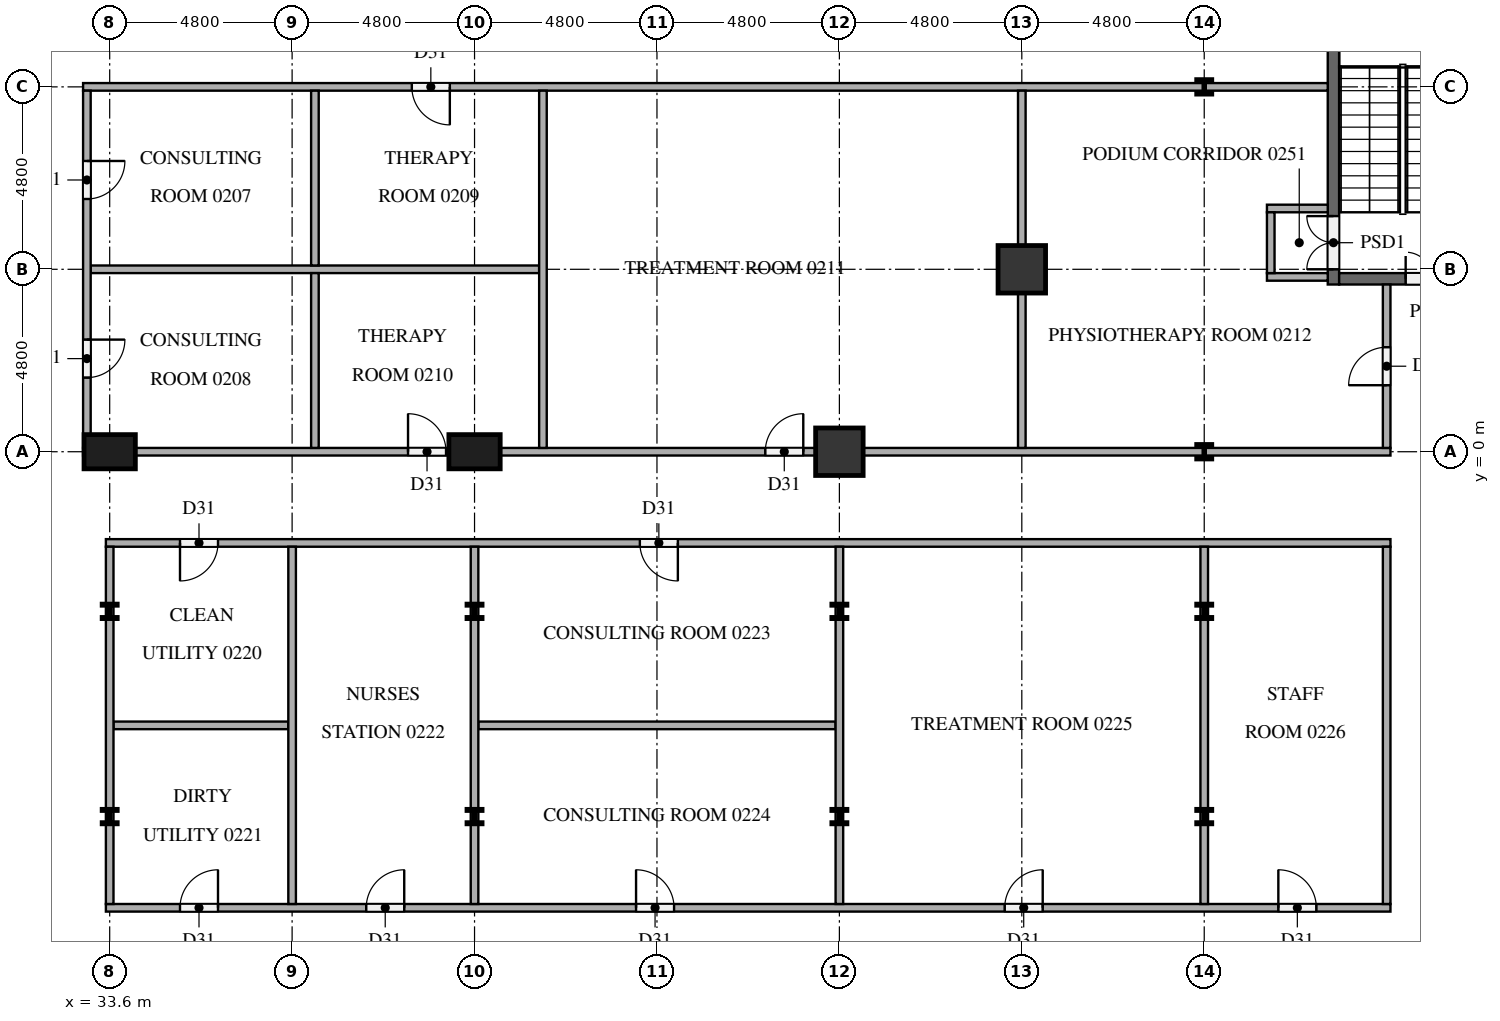
"""IFC4 building model, lengths in metres.
Left out: names, types, materials, properties, quantities, classifications, styles, units other than length and angle.
Written with IfcOpenShell. Run it as: python <this file> out.ifc"""

import sys

from ifc_helpers import new_model, si_unit, direction, frame, frame_2d, origin, origin_2d, place, context, subcontext, project, spatial, rectangle, i_section, extrude, element, fill, save


model = new_model("IFC4")
c1 = context("Model", 3, precision=1e-05, world=origin(), true_north=direction((0.0, 1.0)))
c2 = subcontext(c1, "Body", "Model", "MODEL_VIEW")
j1 = project(units=[si_unit("LENGTHUNIT", "METRE"), si_unit("PLANEANGLEUNIT", "RADIAN")], contexts=[c1])
p1 = place(None, origin())
s1 = spatial("IfcSite", under=j1, at=p1, CompositionType="ELEMENT")
p2 = place(p1, origin())
s2 = spatial("IfcBuilding", under=s1, at=p2, CompositionType="ELEMENT")
p3 = place(p2, frame((0.0, 0.0, 10.5)))
s3 = spatial("IfcBuildingStorey", under=s2, at=p3, CompositionType="ELEMENT", Elevation=10.5)
p4 = place(p3, frame((65.8, 4.4, 0.0), z_axis=(0.0, 0.0, 1.0), x_axis=(0.0, 1.0, 0.0)))
e1 = element("IfcWall", 1, at=p4, inside=s3, PredefinedType="SOLIDWALL", context=c2, shape_type="SweptSolid", body=[
    extrude(rectangle(XDim=8.0, YDim=0.3, at=frame_2d((4.0, 0.0))), origin(), (0.0, 0.0, 1.0), 4.2),
])
p5 = place(p4, frame((0.4, 0.0, 0.0)))
e2 = element("IfcOpeningElement", 2, at=p5, cuts=e1, PredefinedType="OPENING", context=c2, shape_type="SweptSolid", body=[
    extrude(rectangle(XDim=1.4, YDim=2.1, at=frame_2d((0.7, 1.05))), frame((0.0, 0.16, 0.0), z_axis=(0.0, -1.0, 0.0), x_axis=(1.0, 0.0, 0.0)), (0.0, 0.0, 1.0), 0.32),
])
p6 = place(p3, frame((65.95, 4.55, 0.0), z_axis=(0.0, 0.0, 1.0), x_axis=(1.0, 0.0, 0.0)))
e3 = element("IfcWall", 3, at=p6, inside=s3, PredefinedType="SOLIDWALL", context=c2, shape_type="SweptSolid", body=[
    extrude(rectangle(XDim=3.35, YDim=0.3, at=frame_2d((1.675, 0.0))), origin(), (0.0, 0.0, 1.0), 4.2),
])
p7 = place(p6, frame((1.75, 0.0, 0.0)))
e4 = element("IfcOpeningElement", 4, at=p7, cuts=e3, PredefinedType="OPENING", context=c2, shape_type="SweptSolid", body=[
    extrude(rectangle(XDim=1.4, YDim=2.1, at=frame_2d((0.7, 1.05))), frame((0.0, 0.16, 0.0), z_axis=(0.0, -1.0, 0.0), x_axis=(1.0, 0.0, 0.0)), (0.0, 0.0, 1.0), 0.32),
])
for number, where, z_axis, x_axis in (
    (5, (33.6, 0.0, 0.0), (0.0, 0.0, 1.0), (1.0, 0.0, 0.0)),
    (6, (43.2, 0.0, 0.0), (0.0, 0.0, 1.0), (1.0, 0.0, 0.0)),
):
    element("IfcColumn", number, at=place(p3, frame(where, z_axis=z_axis, x_axis=x_axis)), inside=s3, PredefinedType="COLUMN", context=c2, shape_type="SweptSolid", body=[
        extrude(rectangle(XDim=1.35, YDim=0.9, at=origin_2d()), origin(), (0.0, 0.0, 1.0), 4.2),
    ])
for number, where, z_axis, x_axis in (
    (7, (52.8, 0.0, 0.0), (0.0, 0.0, 1.0), (1.0, 0.0, 0.0)),
    (8, (57.6, 4.8, 0.0), (0.0, 0.0, 1.0), (1.0, 0.0, 0.0)),
):
    element("IfcColumn", number, at=place(p3, frame(where, z_axis=z_axis, x_axis=x_axis)), inside=s3, PredefinedType="COLUMN", context=c2, shape_type="SweptSolid", body=[
        extrude(rectangle(XDim=1.25, YDim=1.25, at=origin_2d()), origin(), (0.0, 0.0, 1.0), 4.2),
    ])
for number, where, z_axis, x_axis in (
    (9, (33.6, -9.6, 0.0), (0.0, 0.0, 1.0), (1.0, 0.0, 0.0)),
    (10, (33.6, -4.2, 0.0), (0.0, 0.0, 1.0), (1.0, 0.0, 0.0)),
    (11, (43.2, -9.6, 0.0), (0.0, 0.0, 1.0), (1.0, 0.0, 0.0)),
    (12, (43.2, -4.2, 0.0), (0.0, 0.0, 1.0), (1.0, 0.0, 0.0)),
    (13, (52.8, -9.6, 0.0), (0.0, 0.0, 1.0), (1.0, 0.0, 0.0)),
    (14, (52.8, -4.2, 0.0), (0.0, 0.0, 1.0), (1.0, 0.0, 0.0)),
    (15, (62.4, -9.6, 0.0), (0.0, 0.0, 1.0), (1.0, 0.0, 0.0)),
    (16, (62.4, -4.2, 0.0), (0.0, 0.0, 1.0), (1.0, 0.0, 0.0)),
    (17, (62.4, 0.0, 0.0), (0.0, 0.0, 1.0), (1.0, 0.0, 0.0)),
    (18, (62.4, 9.6, 0.0), (0.0, 0.0, 1.0), (1.0, 0.0, 0.0)),
):
    element("IfcColumn", number, at=place(p3, frame(where, z_axis=z_axis, x_axis=x_axis)), inside=s3, PredefinedType="COLUMN", context=c2, shape_type="SweptSolid", body=[
        extrude(i_section(OverallWidth=0.396, OverallDepth=0.381, WebThickness=0.019, FlangeThickness=0.03, at=origin_2d()), origin(), (0.0, 0.0, 1.0), 4.2),
    ])
p8 = place(p3, frame((33.5, -12.0, 0.0), z_axis=(0.0, 0.0, 1.0), x_axis=(1.0, 0.0, 0.0)))
e19 = element("IfcWall", 19, at=p8, inside=s3, PredefinedType="PARTITIONING", context=c2, shape_type="SweptSolid", body=[
    extrude(rectangle(XDim=33.8, YDim=0.2, at=frame_2d((16.9, 0.0))), origin(), (0.0, 0.0, 1.0), 4.2),
])
p9 = place(p8, frame((1.95, 0.0, 0.0)))
e20 = element("IfcOpeningElement", 20, at=p9, cuts=e19, PredefinedType="OPENING", context=c2, shape_type="SweptSolid", body=[
    extrude(rectangle(XDim=1.0, YDim=2.1, at=frame_2d((0.5, 1.05))), frame((0.0, 0.11, 0.0), z_axis=(0.0, -1.0, 0.0), x_axis=(1.0, 0.0, 0.0)), (0.0, 0.0, 1.0), 0.22),
])
p10 = place(p8, frame((6.85, 0.0, 0.0)))
e21 = element("IfcOpeningElement", 21, at=p10, cuts=e19, PredefinedType="OPENING", context=c2, shape_type="SweptSolid", body=[
    extrude(rectangle(XDim=1.0, YDim=2.1, at=frame_2d((0.5, 1.05))), frame((0.0, 0.11, 0.0), z_axis=(0.0, -1.0, 0.0), x_axis=(1.0, 0.0, 0.0)), (0.0, 0.0, 1.0), 0.22),
])
p11 = place(p8, frame((13.95, 0.0, 0.0)))
e22 = element("IfcOpeningElement", 22, at=p11, cuts=e19, PredefinedType="OPENING", context=c2, shape_type="SweptSolid", body=[
    extrude(rectangle(XDim=1.0, YDim=2.1, at=frame_2d((0.5, 1.05))), frame((0.0, 0.11, 0.0), z_axis=(0.0, -1.0, 0.0), x_axis=(1.0, 0.0, 0.0)), (0.0, 0.0, 1.0), 0.22),
])
p12 = place(p8, frame((23.65, 0.0, 0.0)))
e23 = element("IfcOpeningElement", 23, at=p12, cuts=e19, PredefinedType="OPENING", context=c2, shape_type="SweptSolid", body=[
    extrude(rectangle(XDim=1.0, YDim=2.1, at=frame_2d((0.5, 1.05))), frame((0.0, 0.11, 0.0), z_axis=(0.0, -1.0, 0.0), x_axis=(1.0, 0.0, 0.0)), (0.0, 0.0, 1.0), 0.22),
])
p13 = place(p8, frame((30.85, 0.0, 0.0)))
e24 = element("IfcOpeningElement", 24, at=p13, cuts=e19, PredefinedType="OPENING", context=c2, shape_type="SweptSolid", body=[
    extrude(rectangle(XDim=1.0, YDim=2.1, at=frame_2d((0.5, 1.05))), frame((0.0, 0.11, 0.0), z_axis=(0.0, -1.0, 0.0), x_axis=(1.0, 0.0, 0.0)), (0.0, 0.0, 1.0), 0.22),
])
p14 = place(p3, frame((33.7, -7.2, 0.0), z_axis=(0.0, 0.0, 1.0), x_axis=(1.0, 0.0, 0.0)))
e25 = element("IfcWall", 25, at=p14, inside=s3, PredefinedType="PARTITIONING", context=c2, shape_type="SweptSolid", body=[
    extrude(rectangle(XDim=4.6, YDim=0.2, at=frame_2d((2.3, 0.0))), origin(), (0.0, 0.0, 1.0), 4.2),
])
p15 = place(p3, frame((43.3, -7.2, 0.0), z_axis=(0.0, 0.0, 1.0), x_axis=(1.0, 0.0, 0.0)))
e26 = element("IfcWall", 26, at=p15, inside=s3, PredefinedType="PARTITIONING", context=c2, shape_type="SweptSolid", body=[
    extrude(rectangle(XDim=9.4, YDim=0.2, at=frame_2d((4.7, 0.0))), origin(), (0.0, 0.0, 1.0), 4.2),
])
p16 = place(p3, frame((67.3, -2.4, 0.0), z_axis=(0.0, 0.0, 1.0), x_axis=(-1.0, 0.0, 0.0)))
e27 = element("IfcWall", 27, at=p16, inside=s3, PredefinedType="PARTITIONING", context=c2, shape_type="SweptSolid", body=[
    extrude(rectangle(XDim=33.8, YDim=0.2, at=frame_2d((16.9, 0.0))), origin(), (0.0, 0.0, 1.0), 4.2),
])
p17 = place(p16, frame((30.85, 0.0, 0.0)))
e28 = element("IfcOpeningElement", 28, at=p17, cuts=e27, PredefinedType="OPENING", context=c2, shape_type="SweptSolid", body=[
    extrude(rectangle(XDim=1.0, YDim=2.1, at=frame_2d((0.5, 1.05))), frame((0.0, 0.11, 0.0), z_axis=(0.0, -1.0, 0.0), x_axis=(1.0, 0.0, 0.0)), (0.0, 0.0, 1.0), 0.22),
])
p18 = place(p16, frame((18.75, 0.0, 0.0)))
e29 = element("IfcOpeningElement", 29, at=p18, cuts=e27, PredefinedType="OPENING", context=c2, shape_type="SweptSolid", body=[
    extrude(rectangle(XDim=1.0, YDim=2.1, at=frame_2d((0.5, 1.05))), frame((0.0, 0.11, 0.0), z_axis=(0.0, -1.0, 0.0), x_axis=(1.0, 0.0, 0.0)), (0.0, 0.0, 1.0), 0.22),
])
p19 = place(p3, frame((32.9, 0.0, 0.0), z_axis=(0.0, 0.0, 1.0), x_axis=(1.0, 0.0, 0.0)))
e30 = element("IfcWall", 30, at=p19, inside=s3, PredefinedType="PARTITIONING", context=c2, shape_type="SweptSolid", body=[
    extrude(rectangle(XDim=34.4, YDim=0.2, at=frame_2d((17.2, 0.0))), origin(), (0.0, 0.0, 1.0), 4.2),
])
p20 = place(p19, frame((8.55, 0.0, 0.0)))
e31 = element("IfcOpeningElement", 31, at=p20, cuts=e30, PredefinedType="OPENING", context=c2, shape_type="SweptSolid", body=[
    extrude(rectangle(XDim=1.0, YDim=2.1, at=frame_2d((0.5, 1.05))), frame((0.0, 0.11, 0.0), z_axis=(0.0, -1.0, 0.0), x_axis=(1.0, 0.0, 0.0)), (0.0, 0.0, 1.0), 0.22),
])
p21 = place(p19, frame((17.95, 0.0, 0.0)))
e32 = element("IfcOpeningElement", 32, at=p21, cuts=e30, PredefinedType="OPENING", context=c2, shape_type="SweptSolid", body=[
    extrude(rectangle(XDim=1.0, YDim=2.1, at=frame_2d((0.5, 1.05))), frame((0.0, 0.11, 0.0), z_axis=(0.0, -1.0, 0.0), x_axis=(1.0, 0.0, 0.0)), (0.0, 0.0, 1.0), 0.22),
])
p22 = place(p3, frame((64.05, 4.6, 0.0), z_axis=(0.0, 0.0, 1.0), x_axis=(1.0, 0.0, 0.0)))
e33 = element("IfcWall", 33, at=p22, inside=s3, PredefinedType="PARTITIONING", context=c2, shape_type="SweptSolid", body=[
    extrude(rectangle(XDim=1.6, YDim=0.2, at=frame_2d((0.8, 0.0))), origin(), (0.0, 0.0, 1.0), 4.2),
])
p23 = place(p3, frame((33.1, 4.8, 0.0), z_axis=(0.0, 0.0, 1.0), x_axis=(1.0, 0.0, 0.0)))
e34 = element("IfcWall", 34, at=p23, inside=s3, PredefinedType="PARTITIONING", context=c2, shape_type="SweptSolid", body=[
    extrude(rectangle(XDim=11.8, YDim=0.2, at=frame_2d((5.9, 0.0))), origin(), (0.0, 0.0, 1.0), 4.2),
])
p24 = place(p3, frame((64.05, 6.4, 0.0), z_axis=(0.0, 0.0, 1.0), x_axis=(1.0, 0.0, 0.0)))
e35 = element("IfcWall", 35, at=p24, inside=s3, PredefinedType="PARTITIONING", context=c2, shape_type="SweptSolid", body=[
    extrude(rectangle(XDim=1.6, YDim=0.2, at=frame_2d((0.8, 0.0))), origin(), (0.0, 0.0, 1.0), 4.2),
])
p25 = place(p3, frame((65.65, 9.6, 0.0), z_axis=(0.0, 0.0, 1.0), x_axis=(-1.0, 0.0, 0.0)))
e36 = element("IfcWall", 36, at=p25, inside=s3, PredefinedType="PARTITIONING", context=c2, shape_type="SweptSolid", body=[
    extrude(rectangle(XDim=32.75, YDim=0.2, at=frame_2d((16.375, 0.0))), origin(), (0.0, 0.0, 1.0), 4.2),
])
p26 = place(p25, frame((23.1, 0.0, 0.0)))
e37 = element("IfcOpeningElement", 37, at=p26, cuts=e36, PredefinedType="OPENING", context=c2, shape_type="SweptSolid", body=[
    extrude(rectangle(XDim=1.0, YDim=2.1, at=frame_2d((0.5, 1.05))), frame((0.0, 0.11, 0.0), z_axis=(0.0, -1.0, 0.0), x_axis=(1.0, 0.0, 0.0)), (0.0, 0.0, 1.0), 0.22),
])
p27 = place(p3, frame((33.0, 9.5, 0.0), z_axis=(0.0, 0.0, 1.0), x_axis=(0.0, -1.0, 0.0)))
e38 = element("IfcWall", 38, at=p27, inside=s3, PredefinedType="PARTITIONING", context=c2, shape_type="SweptSolid", body=[
    extrude(rectangle(XDim=9.4, YDim=0.2, at=frame_2d((4.7, 0.0))), origin(), (0.0, 0.0, 1.0), 4.2),
])
p28 = place(p27, frame((1.85, 0.0, 0.0)))
e39 = element("IfcOpeningElement", 39, at=p28, cuts=e38, PredefinedType="OPENING", context=c2, shape_type="SweptSolid", body=[
    extrude(rectangle(XDim=1.0, YDim=2.1, at=frame_2d((0.5, 1.05))), frame((0.0, 0.11, 0.0), z_axis=(0.0, -1.0, 0.0), x_axis=(1.0, 0.0, 0.0)), (0.0, 0.0, 1.0), 0.22),
])
p29 = place(p27, frame((6.55, 0.0, 0.0)))
e40 = element("IfcOpeningElement", 40, at=p29, cuts=e38, PredefinedType="OPENING", context=c2, shape_type="SweptSolid", body=[
    extrude(rectangle(XDim=1.0, YDim=2.1, at=frame_2d((0.5, 1.05))), frame((0.0, 0.11, 0.0), z_axis=(0.0, -1.0, 0.0), x_axis=(1.0, 0.0, 0.0)), (0.0, 0.0, 1.0), 0.22),
])
for number, where, z_axis, x_axis in (
    (41, (33.6, -11.9, 0.0), (0.0, 0.0, 1.0), (0.0, 1.0, 0.0)),
    (42, (38.4, -11.9, 0.0), (0.0, 0.0, 1.0), (0.0, 1.0, 0.0)),
):
    element("IfcWall", number, at=place(p3, frame(where, z_axis=z_axis, x_axis=x_axis)), inside=s3, PredefinedType="PARTITIONING", context=c2, shape_type="SweptSolid", body=[
        extrude(rectangle(XDim=9.4, YDim=0.2, at=frame_2d((4.7, 0.0))), origin(), (0.0, 0.0, 1.0), 4.2),
    ])
p30 = place(p3, frame((39.0, 0.1, 0.0), z_axis=(0.0, 0.0, 1.0), x_axis=(0.0, 1.0, 0.0)))
e43 = element("IfcWall", 43, at=p30, inside=s3, PredefinedType="PARTITIONING", context=c2, shape_type="SweptSolid", body=[
    extrude(rectangle(XDim=4.6, YDim=0.2, at=frame_2d((2.3, 0.0))), origin(), (0.0, 0.0, 1.0), 4.2),
])
p31 = place(p3, frame((39.0, 4.9, 0.0), z_axis=(0.0, 0.0, 1.0), x_axis=(0.0, 1.0, 0.0)))
e44 = element("IfcWall", 44, at=p31, inside=s3, PredefinedType="PARTITIONING", context=c2, shape_type="SweptSolid", body=[
    extrude(rectangle(XDim=4.6, YDim=0.2, at=frame_2d((2.3, 0.0))), origin(), (0.0, 0.0, 1.0), 4.2),
])
for number, where, z_axis, x_axis in (
    (45, (43.2, -11.9, 0.0), (0.0, 0.0, 1.0), (0.0, 1.0, 0.0)),
    (46, (45.0, 0.1, 0.0), (0.0, 0.0, 1.0), (0.0, 1.0, 0.0)),
    (47, (52.8, -11.9, 0.0), (0.0, 0.0, 1.0), (0.0, 1.0, 0.0)),
    (48, (57.6, 0.1, 0.0), (0.0, 0.0, 1.0), (0.0, 1.0, 0.0)),
    (49, (62.4, -11.9, 0.0), (0.0, 0.0, 1.0), (0.0, 1.0, 0.0)),
):
    element("IfcWall", number, at=place(p3, frame(where, z_axis=z_axis, x_axis=x_axis)), inside=s3, PredefinedType="PARTITIONING", context=c2, shape_type="SweptSolid", body=[
        extrude(rectangle(XDim=9.4, YDim=0.2, at=frame_2d((4.7, 0.0))), origin(), (0.0, 0.0, 1.0), 4.2),
    ])
p32 = place(p3, frame((64.15, 4.7, 0.0), z_axis=(0.0, 0.0, 1.0), x_axis=(0.0, 1.0, 0.0)))
e50 = element("IfcWall", 50, at=p32, inside=s3, PredefinedType="PARTITIONING", context=c2, shape_type="SweptSolid", body=[
    extrude(rectangle(XDim=1.6, YDim=0.2, at=frame_2d((0.8, 0.0))), origin(), (0.0, 0.0, 1.0), 4.2),
])
p33 = place(p3, frame((67.2, -11.9, 0.0), z_axis=(0.0, 0.0, 1.0), x_axis=(0.0, 1.0, 0.0)))
e51 = element("IfcWall", 51, at=p33, inside=s3, PredefinedType="PARTITIONING", context=c2, shape_type="SweptSolid", body=[
    extrude(rectangle(XDim=9.4, YDim=0.2, at=frame_2d((4.7, 0.0))), origin(), (0.0, 0.0, 1.0), 4.2),
])
p34 = place(p3, frame((67.2, 0.1, 0.0), z_axis=(0.0, 0.0, 1.0), x_axis=(0.0, 1.0, 0.0)))
e52 = element("IfcWall", 52, at=p34, inside=s3, PredefinedType="PARTITIONING", context=c2, shape_type="SweptSolid", body=[
    extrude(rectangle(XDim=4.3, YDim=0.2, at=frame_2d((2.15, 0.0))), origin(), (0.0, 0.0, 1.0), 4.2),
])
p35 = place(p34, frame((1.65, 0.0, 0.0)))
e53 = element("IfcOpeningElement", 53, at=p35, cuts=e52, PredefinedType="OPENING", context=c2, shape_type="SweptSolid", body=[
    extrude(rectangle(XDim=1.0, YDim=2.1, at=frame_2d((0.5, 1.05))), frame((0.0, 0.11, 0.0), z_axis=(0.0, -1.0, 0.0), x_axis=(1.0, 0.0, 0.0)), (0.0, 0.0, 1.0), 0.22),
])
p36 = place(p5, frame((1.4, 0.0, 0.0), z_axis=(0.0, 0.0, 1.0), x_axis=(-1.0, 0.0, 0.0)))
e54 = element("IfcDoor", 54, at=p36, inside=s3, OperationType="DOUBLE_DOOR_SINGLE_SWING", PredefinedType="DOOR", context=c2, shape_type="SweptSolid", body=[
    extrude(rectangle(XDim=1.4, YDim=2.1, at=frame_2d((0.7, 1.05))), frame((0.0, 0.025, 0.0), z_axis=(0.0, -1.0, 0.0), x_axis=(1.0, 0.0, 0.0)), (0.0, 0.0, 1.0), 0.05),
])
fill(e2, e54)
p37 = place(p7, origin())
e55 = element("IfcDoor", 55, at=p37, inside=s3, OperationType="DOUBLE_DOOR_SINGLE_SWING", PredefinedType="DOOR", context=c2, shape_type="SweptSolid", body=[
    extrude(rectangle(XDim=1.4, YDim=2.1, at=frame_2d((0.7, 1.05))), frame((0.0, 0.025, 0.0), z_axis=(0.0, -1.0, 0.0), x_axis=(1.0, 0.0, 0.0)), (0.0, 0.0, 1.0), 0.05),
])
fill(e4, e55)
p38 = place(p28, origin())
e56 = element("IfcDoor", 56, at=p38, inside=s3, OperationType="SINGLE_SWING_LEFT", PredefinedType="DOOR", context=c2, shape_type="SweptSolid", body=[
    extrude(rectangle(XDim=1.0, YDim=2.1, at=frame_2d((0.5, 1.05))), frame((0.0, 0.025, 0.0), z_axis=(0.0, -1.0, 0.0), x_axis=(1.0, 0.0, 0.0)), (0.0, 0.0, 1.0), 0.05),
])
fill(e39, e56)
p39 = place(p29, origin())
e57 = element("IfcDoor", 57, at=p39, inside=s3, OperationType="SINGLE_SWING_LEFT", PredefinedType="DOOR", context=c2, shape_type="SweptSolid", body=[
    extrude(rectangle(XDim=1.0, YDim=2.1, at=frame_2d((0.5, 1.05))), frame((0.0, 0.025, 0.0), z_axis=(0.0, -1.0, 0.0), x_axis=(1.0, 0.0, 0.0)), (0.0, 0.0, 1.0), 0.05),
])
fill(e40, e57)
p40 = place(p26, origin())
e58 = element("IfcDoor", 58, at=p40, inside=s3, OperationType="SINGLE_SWING_LEFT", PredefinedType="DOOR", context=c2, shape_type="SweptSolid", body=[
    extrude(rectangle(XDim=1.0, YDim=2.1, at=frame_2d((0.5, 1.05))), frame((0.0, 0.025, 0.0), z_axis=(0.0, -1.0, 0.0), x_axis=(1.0, 0.0, 0.0)), (0.0, 0.0, 1.0), 0.05),
])
fill(e37, e58)
p41 = place(p20, origin())
e59 = element("IfcDoor", 59, at=p41, inside=s3, OperationType="SINGLE_SWING_LEFT", PredefinedType="DOOR", context=c2, shape_type="SweptSolid", body=[
    extrude(rectangle(XDim=1.0, YDim=2.1, at=frame_2d((0.5, 1.05))), frame((0.0, 0.025, 0.0), z_axis=(0.0, -1.0, 0.0), x_axis=(1.0, 0.0, 0.0)), (0.0, 0.0, 1.0), 0.05),
])
fill(e31, e59)
p42 = place(p21, origin())
e60 = element("IfcDoor", 60, at=p42, inside=s3, OperationType="SINGLE_SWING_RIGHT", PredefinedType="DOOR", context=c2, shape_type="SweptSolid", body=[
    extrude(rectangle(XDim=1.0, YDim=2.1, at=frame_2d((0.5, 1.05))), frame((0.0, 0.025, 0.0), z_axis=(0.0, -1.0, 0.0), x_axis=(1.0, 0.0, 0.0)), (0.0, 0.0, 1.0), 0.05),
])
fill(e32, e60)
p43 = place(p35, origin())
e61 = element("IfcDoor", 61, at=p43, inside=s3, OperationType="SINGLE_SWING_LEFT", PredefinedType="DOOR", context=c2, shape_type="SweptSolid", body=[
    extrude(rectangle(XDim=1.0, YDim=2.1, at=frame_2d((0.5, 1.05))), frame((0.0, 0.025, 0.0), z_axis=(0.0, -1.0, 0.0), x_axis=(1.0, 0.0, 0.0)), (0.0, 0.0, 1.0), 0.05),
])
fill(e53, e61)
p44 = place(p17, origin())
e62 = element("IfcDoor", 62, at=p44, inside=s3, OperationType="SINGLE_SWING_RIGHT", PredefinedType="DOOR", context=c2, shape_type="SweptSolid", body=[
    extrude(rectangle(XDim=1.0, YDim=2.1, at=frame_2d((0.5, 1.05))), frame((0.0, 0.025, 0.0), z_axis=(0.0, -1.0, 0.0), x_axis=(1.0, 0.0, 0.0)), (0.0, 0.0, 1.0), 0.05),
])
fill(e28, e62)
p45 = place(p9, origin())
e63 = element("IfcDoor", 63, at=p45, inside=s3, OperationType="SINGLE_SWING_RIGHT", PredefinedType="DOOR", context=c2, shape_type="SweptSolid", body=[
    extrude(rectangle(XDim=1.0, YDim=2.1, at=frame_2d((0.5, 1.05))), frame((0.0, 0.025, 0.0), z_axis=(0.0, -1.0, 0.0), x_axis=(1.0, 0.0, 0.0)), (0.0, 0.0, 1.0), 0.05),
])
fill(e20, e63)
p46 = place(p10, origin())
e64 = element("IfcDoor", 64, at=p46, inside=s3, OperationType="SINGLE_SWING_RIGHT", PredefinedType="DOOR", context=c2, shape_type="SweptSolid", body=[
    extrude(rectangle(XDim=1.0, YDim=2.1, at=frame_2d((0.5, 1.05))), frame((0.0, 0.025, 0.0), z_axis=(0.0, -1.0, 0.0), x_axis=(1.0, 0.0, 0.0)), (0.0, 0.0, 1.0), 0.05),
])
fill(e21, e64)
p47 = place(p18, origin())
e65 = element("IfcDoor", 65, at=p47, inside=s3, OperationType="SINGLE_SWING_LEFT", PredefinedType="DOOR", context=c2, shape_type="SweptSolid", body=[
    extrude(rectangle(XDim=1.0, YDim=2.1, at=frame_2d((0.5, 1.05))), frame((0.0, 0.025, 0.0), z_axis=(0.0, -1.0, 0.0), x_axis=(1.0, 0.0, 0.0)), (0.0, 0.0, 1.0), 0.05),
])
fill(e29, e65)
p48 = place(p11, origin())
e66 = element("IfcDoor", 66, at=p48, inside=s3, OperationType="SINGLE_SWING_LEFT", PredefinedType="DOOR", context=c2, shape_type="SweptSolid", body=[
    extrude(rectangle(XDim=1.0, YDim=2.1, at=frame_2d((0.5, 1.05))), frame((0.0, 0.025, 0.0), z_axis=(0.0, -1.0, 0.0), x_axis=(1.0, 0.0, 0.0)), (0.0, 0.0, 1.0), 0.05),
])
fill(e22, e66)
p49 = place(p12, origin())
e67 = element("IfcDoor", 67, at=p49, inside=s3, OperationType="SINGLE_SWING_RIGHT", PredefinedType="DOOR", context=c2, shape_type="SweptSolid", body=[
    extrude(rectangle(XDim=1.0, YDim=2.1, at=frame_2d((0.5, 1.05))), frame((0.0, 0.025, 0.0), z_axis=(0.0, -1.0, 0.0), x_axis=(1.0, 0.0, 0.0)), (0.0, 0.0, 1.0), 0.05),
])
fill(e23, e67)
p50 = place(p13, origin())
e68 = element("IfcDoor", 68, at=p50, inside=s3, OperationType="SINGLE_SWING_LEFT", PredefinedType="DOOR", context=c2, shape_type="SweptSolid", body=[
    extrude(rectangle(XDim=1.0, YDim=2.1, at=frame_2d((0.5, 1.05))), frame((0.0, 0.025, 0.0), z_axis=(0.0, -1.0, 0.0), x_axis=(1.0, 0.0, 0.0)), (0.0, 0.0, 1.0), 0.05),
])
fill(e24, e68)
save(model, sys.argv[1])
